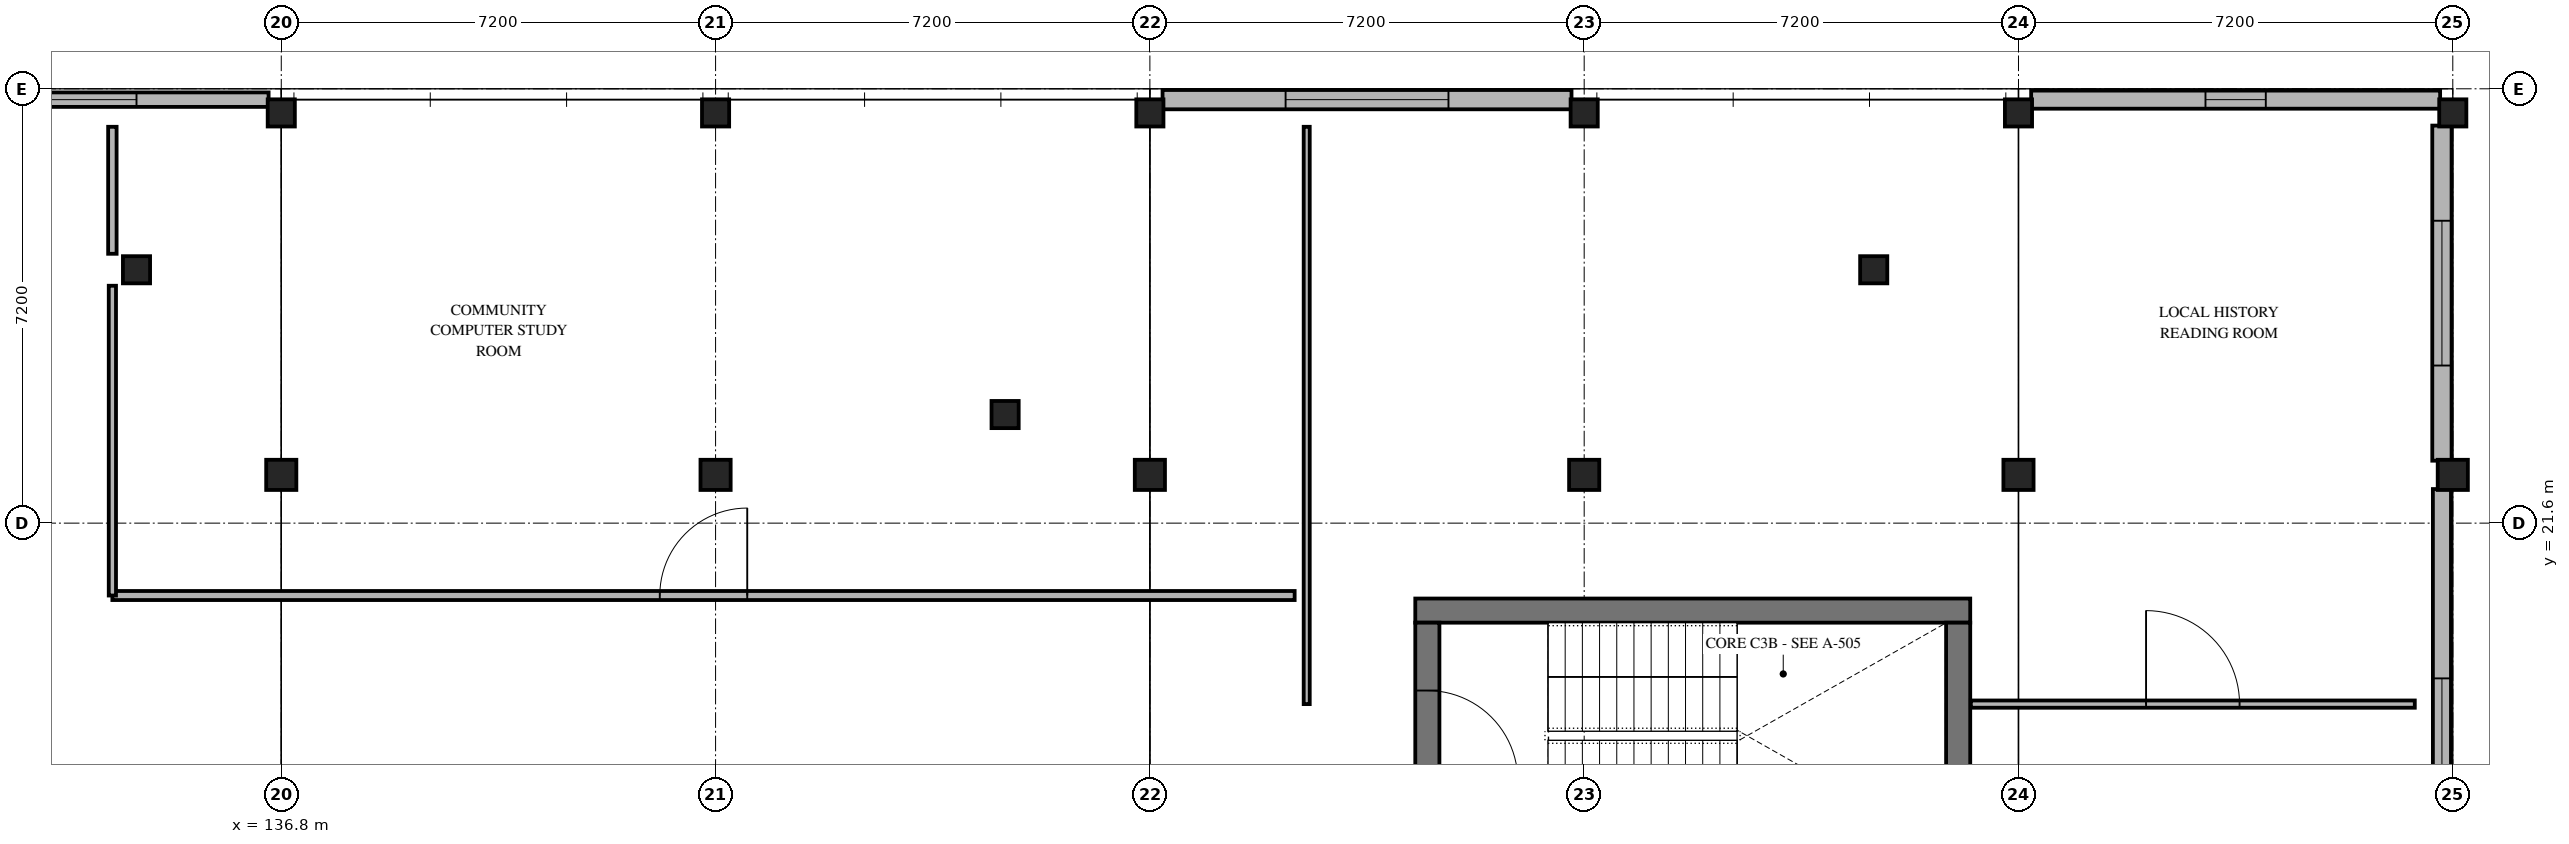
"""IFC4 building model, lengths in metres.
Left out: names, types, materials, properties, quantities, classifications, styles, units other than length and angle.
Written with IfcOpenShell. Run it as: python <this file> out.ifc"""

import sys

from ifc_helpers import new_model, si_unit, direction, frame, frame_2d, origin, origin_2d, place, context, subcontext, project, spatial, rectangle, extrude, element, fill, save


model = new_model("IFC4")
c1 = context("Model", 3, precision=1e-05, world=origin(), true_north=direction((0.0, 1.0)))
c2 = subcontext(c1, "Body", "Model", "MODEL_VIEW")
j1 = project(units=[si_unit("LENGTHUNIT", "METRE"), si_unit("PLANEANGLEUNIT", "RADIAN")], contexts=[c1])
p1 = place(None, origin())
s1 = spatial("IfcSite", under=j1, at=p1, CompositionType="ELEMENT")
p2 = place(p1, origin())
s2 = spatial("IfcBuilding", under=s1, at=p2, CompositionType="ELEMENT")
p3 = place(p2, frame((0.0, 0.0, 4.5)))
s3 = spatial("IfcBuildingStorey", under=s2, at=p3, CompositionType="ELEMENT", Elevation=4.5)
p4 = place(p3, frame((136.8, 22.4, 0.0), z_axis=(0.0, 0.0, 1.0), x_axis=(1.0, 0.0, 0.0)))
e1 = element("IfcColumn", 1, at=p4, inside=s3, PredefinedType="COLUMN", context=c2, shape_type="SweptSolid", body=[
    extrude(rectangle(XDim=0.5, YDim=0.5, at=origin_2d()), origin(), (0.0, 0.0, 1.0), 4.2),
])
p5 = place(p3, frame((136.8, 28.4, 0.0), z_axis=(0.0, 0.0, 1.0), x_axis=(1.0, 0.0, 0.0)))
e2 = element("IfcColumn", 2, at=p5, inside=s3, PredefinedType="COLUMN", context=c2, shape_type="SweptSolid", body=[
    extrude(rectangle(XDim=0.45, YDim=0.45, at=origin_2d()), origin(), (0.0, 0.0, 1.0), 4.2),
])
p6 = place(p3, frame((144.0, 22.4, 0.0), z_axis=(0.0, 0.0, 1.0), x_axis=(1.0, 0.0, 0.0)))
e3 = element("IfcColumn", 3, at=p6, inside=s3, PredefinedType="COLUMN", context=c2, shape_type="SweptSolid", body=[
    extrude(rectangle(XDim=0.5, YDim=0.5, at=origin_2d()), origin(), (0.0, 0.0, 1.0), 4.2),
])
p7 = place(p3, frame((144.0, 28.4, 0.0), z_axis=(0.0, 0.0, 1.0), x_axis=(1.0, 0.0, 0.0)))
e4 = element("IfcColumn", 4, at=p7, inside=s3, PredefinedType="COLUMN", context=c2, shape_type="SweptSolid", body=[
    extrude(rectangle(XDim=0.45, YDim=0.45, at=origin_2d()), origin(), (0.0, 0.0, 1.0), 4.2),
])
p8 = place(p3, frame((151.2, 22.4, 0.0), z_axis=(0.0, 0.0, 1.0), x_axis=(1.0, 0.0, 0.0)))
e5 = element("IfcColumn", 5, at=p8, inside=s3, PredefinedType="COLUMN", context=c2, shape_type="SweptSolid", body=[
    extrude(rectangle(XDim=0.5, YDim=0.5, at=origin_2d()), origin(), (0.0, 0.0, 1.0), 4.2),
])
p9 = place(p3, frame((151.2, 28.4, 0.0), z_axis=(0.0, 0.0, 1.0), x_axis=(1.0, 0.0, 0.0)))
e6 = element("IfcColumn", 6, at=p9, inside=s3, PredefinedType="COLUMN", context=c2, shape_type="SweptSolid", body=[
    extrude(rectangle(XDim=0.45, YDim=0.45, at=origin_2d()), origin(), (0.0, 0.0, 1.0), 4.2),
])
p10 = place(p3, frame((158.4, 22.4, 0.0), z_axis=(0.0, 0.0, 1.0), x_axis=(1.0, 0.0, 0.0)))
e7 = element("IfcColumn", 7, at=p10, inside=s3, PredefinedType="COLUMN", context=c2, shape_type="SweptSolid", body=[
    extrude(rectangle(XDim=0.5, YDim=0.5, at=origin_2d()), origin(), (0.0, 0.0, 1.0), 4.2),
])
p11 = place(p3, frame((158.4, 28.4, 0.0), z_axis=(0.0, 0.0, 1.0), x_axis=(1.0, 0.0, 0.0)))
e8 = element("IfcColumn", 8, at=p11, inside=s3, PredefinedType="COLUMN", context=c2, shape_type="SweptSolid", body=[
    extrude(rectangle(XDim=0.45, YDim=0.45, at=origin_2d()), origin(), (0.0, 0.0, 1.0), 4.2),
])
p12 = place(p3, frame((165.6, 22.4, 0.0), z_axis=(0.0, 0.0, 1.0), x_axis=(1.0, 0.0, 0.0)))
e9 = element("IfcColumn", 9, at=p12, inside=s3, PredefinedType="COLUMN", context=c2, shape_type="SweptSolid", body=[
    extrude(rectangle(XDim=0.5, YDim=0.5, at=origin_2d()), origin(), (0.0, 0.0, 1.0), 4.2),
])
p13 = place(p3, frame((165.6, 28.4, 0.0), z_axis=(0.0, 0.0, 1.0), x_axis=(1.0, 0.0, 0.0)))
e10 = element("IfcColumn", 10, at=p13, inside=s3, PredefinedType="COLUMN", context=c2, shape_type="SweptSolid", body=[
    extrude(rectangle(XDim=0.45, YDim=0.45, at=origin_2d()), origin(), (0.0, 0.0, 1.0), 4.2),
])
p14 = place(p3, frame((172.8, 22.4, 0.0), z_axis=(0.0, 0.0, 1.0), x_axis=(1.0, 0.0, 0.0)))
e11 = element("IfcColumn", 11, at=p14, inside=s3, PredefinedType="COLUMN", context=c2, shape_type="SweptSolid", body=[
    extrude(rectangle(XDim=0.5, YDim=0.5, at=origin_2d()), origin(), (0.0, 0.0, 1.0), 4.2),
])
for number, where, z_axis, x_axis in (
    (12, (172.8, 28.4, 0.0), (0.0, 0.0, 1.0), (1.0, 0.0, 0.0)),
    (13, (134.4, 25.8, 0.0), (0.0, 0.0, 1.0), (1.0, 0.0, 0.0)),
    (14, (148.8, 23.4, 0.0), (0.0, 0.0, 1.0), (1.0, 0.0, 0.0)),
    (15, (163.2, 25.8, 0.0), (0.0, 0.0, 1.0), (1.0, 0.0, 0.0)),
):
    element("IfcColumn", number, at=place(p3, frame(where, z_axis=z_axis, x_axis=x_axis)), inside=s3, PredefinedType="COLUMN", context=c2, shape_type="SweptSolid", body=[
        extrude(rectangle(XDim=0.45, YDim=0.45, at=origin_2d()), origin(), (0.0, 0.0, 1.0), 4.2),
    ])
p15 = place(p3, frame((172.62, 28.19, 0.0), z_axis=(0.0, 0.0, 1.0), x_axis=(0.0, -1.0, 0.0)))
e16 = element("IfcWall", 16, at=p15, inside=s3, PredefinedType="SOLIDWALL", context=c2, shape_type="SweptSolid", body=[
    extrude(rectangle(XDim=5.555, YDim=0.32, at=frame_2d((2.777, 0.0))), origin(), (0.0, 0.0, 1.0), 3.15),
])
p16 = place(p15, frame((1.577, 0.0, 0.75)))
e17 = element("IfcOpeningElement", 17, at=p16, cuts=e16, PredefinedType="OPENING", context=c2, shape_type="SweptSolid", body=[
    extrude(rectangle(XDim=2.4, YDim=1.65, at=frame_2d((1.2, 0.825))), frame((0.0, 0.17, 0.0), z_axis=(0.0, -1.0, 0.0), x_axis=(1.0, 0.0, 0.0)), (0.0, 0.0, 1.0), 0.34),
])
p17 = place(p3, frame((172.62, 22.165, 0.0), z_axis=(0.0, 0.0, 1.0), x_axis=(0.0, -1.0, 0.0)))
e18 = element("IfcWall", 18, at=p17, inside=s3, PredefinedType="SOLIDWALL", context=c2, shape_type="SweptSolid", body=[
    extrude(rectangle(XDim=7.777, YDim=0.3, at=frame_2d((3.889, 0.0))), origin(), (0.0, 0.0, 1.0), 3.33),
])
p18 = place(p17, frame((3.138, 0.0, 0.9)))
e19 = element("IfcOpeningElement", 19, at=p18, cuts=e18, PredefinedType="OPENING", context=c2, shape_type="SweptSolid", body=[
    extrude(rectangle(XDim=1.5, YDim=0.75, at=frame_2d((0.75, 0.375))), frame((0.0, 0.16, 0.0), z_axis=(0.0, -1.0, 0.0), x_axis=(1.0, 0.0, 0.0)), (0.0, 0.0, 1.0), 0.32),
])
p19 = place(p3, frame((129.81, 28.62, 0.0), z_axis=(0.0, 0.0, 1.0), x_axis=(1.0, 0.0, 0.0)))
e20 = element("IfcWall", 20, at=p19, inside=s3, PredefinedType="SOLIDWALL", context=c2, shape_type="SweptSolid", body=[
    extrude(rectangle(XDim=6.78, YDim=0.24, at=frame_2d((3.39, 0.0))), origin(), (0.0, 0.0, 1.0), 3.35),
])
p20 = place(p19, frame((2.19, 0.0, 0.9)))
e21 = element("IfcOpeningElement", 21, at=p20, cuts=e20, PredefinedType="OPENING", context=c2, shape_type="SweptSolid", body=[
    extrude(rectangle(XDim=2.4, YDim=0.75, at=frame_2d((1.2, 0.375))), frame((0.0, 0.13, 0.0), z_axis=(0.0, -1.0, 0.0), x_axis=(1.0, 0.0, 0.0)), (0.0, 0.0, 1.0), 0.26),
])
p21 = place(p3, frame((151.41, 28.62, 0.0), z_axis=(0.0, 0.0, 1.0), x_axis=(1.0, 0.0, 0.0)))
e22 = element("IfcWall", 22, at=p21, inside=s3, PredefinedType="SOLIDWALL", context=c2, shape_type="SweptSolid", body=[
    extrude(rectangle(XDim=6.78, YDim=0.32, at=frame_2d((3.39, 0.0))), origin(), (0.0, 0.0, 1.0), 3.25),
])
p22 = place(p21, frame((2.04, 0.0, 0.9)))
e23 = element("IfcOpeningElement", 23, at=p22, cuts=e22, PredefinedType="OPENING", context=c2, shape_type="SweptSolid", body=[
    extrude(rectangle(XDim=2.7, YDim=0.75, at=frame_2d((1.35, 0.375))), frame((0.0, 0.17, 0.0), z_axis=(0.0, -1.0, 0.0), x_axis=(1.0, 0.0, 0.0)), (0.0, 0.0, 1.0), 0.34),
])
p23 = place(p3, frame((165.81, 28.62, 0.0), z_axis=(0.0, 0.0, 1.0), x_axis=(1.0, 0.0, 0.0)))
e24 = element("IfcWall", 24, at=p23, inside=s3, PredefinedType="SOLIDWALL", context=c2, shape_type="SweptSolid", body=[
    extrude(rectangle(XDim=6.78, YDim=0.3, at=frame_2d((3.39, 0.0))), origin(), (0.0, 0.0, 1.0), 3.35),
])
p24 = place(p23, frame((2.89, 0.0, 0.75)))
e25 = element("IfcOpeningElement", 25, at=p24, cuts=e24, PredefinedType="OPENING", context=c2, shape_type="SweptSolid", body=[
    extrude(rectangle(XDim=1.0, YDim=1.45, at=frame_2d((0.5, 0.725))), frame((0.0, 0.16, 0.0), z_axis=(0.0, -1.0, 0.0), x_axis=(1.0, 0.0, 0.0)), (0.0, 0.0, 1.0), 0.32),
])
p25 = place(p3, frame((164.8, 20.15, 0.0), z_axis=(0.0, 0.0, 1.0), x_axis=(-1.0, 0.0, 0.0)))
e26 = element("IfcWall", 26, at=p25, inside=s3, PredefinedType="SHEAR", context=c2, shape_type="SweptSolid", body=[
    extrude(rectangle(XDim=9.2, YDim=0.4, at=frame_2d((4.6, 0.0))), origin(), (0.0, 0.0, 1.0), 3.95),
])
p26 = place(p3, frame((164.6, 16.2, 0.0), z_axis=(0.0, 0.0, 1.0), x_axis=(0.0, 1.0, 0.0)))
e27 = element("IfcWall", 27, at=p26, inside=s3, PredefinedType="SHEAR", context=c2, shape_type="SweptSolid", body=[
    extrude(rectangle(XDim=3.75, YDim=0.4, at=frame_2d((1.875, 0.0))), origin(), (0.0, 0.0, 1.0), 3.95),
])
p27 = place(p3, frame((155.8, 19.95, 0.0), z_axis=(0.0, 0.0, 1.0), x_axis=(0.0, -1.0, 0.0)))
e28 = element("IfcWall", 28, at=p27, inside=s3, PredefinedType="SHEAR", context=c2, shape_type="SweptSolid", body=[
    extrude(rectangle(XDim=3.75, YDim=0.4, at=frame_2d((1.875, 0.0))), origin(), (0.0, 0.0, 1.0), 3.95),
])
p28 = place(p27, frame((1.125, 0.0, 0.0)))
e29 = element("IfcOpeningElement", 29, at=p28, cuts=e28, PredefinedType="OPENING", context=c2, shape_type="SweptSolid", body=[
    extrude(rectangle(XDim=1.5, YDim=2.2, at=frame_2d((0.75, 1.1))), frame((0.0, 0.21, 0.0), z_axis=(0.0, -1.0, 0.0), x_axis=(1.0, 0.0, 0.0)), (0.0, 0.0, 1.0), 0.42),
])
p29 = place(p3, frame((164.81, 18.6, 0.0), z_axis=(0.0, 0.0, 1.0), x_axis=(1.0, 0.0, 0.0)))
e30 = element("IfcWall", 30, at=p29, inside=s3, PredefinedType="PARTITIONING", context=c2, shape_type="SweptSolid", body=[
    extrude(rectangle(XDim=7.36, YDim=0.12, at=frame_2d((3.68, 0.0))), origin(), (0.0, 0.0, 1.0), 3.25),
])
p30 = place(p29, frame((2.905, 0.0, 0.0)))
e31 = element("IfcOpeningElement", 31, at=p30, cuts=e30, PredefinedType="OPENING", context=c2, shape_type="SweptSolid", body=[
    extrude(rectangle(XDim=1.55, YDim=2.25, at=frame_2d((0.775, 1.125))), frame((0.0, 0.07, 0.0), z_axis=(0.0, -1.0, 0.0), x_axis=(1.0, 0.0, 0.0)), (0.0, 0.0, 1.0), 0.14),
])
p31 = place(p3, frame((153.8, 28.17, 0.0), z_axis=(0.0, 0.0, 1.0), x_axis=(0.0, -1.0, 0.0)))
e32 = element("IfcWall", 32, at=p31, inside=s3, PredefinedType="PARTITIONING", context=c2, shape_type="SweptSolid", body=[
    extrude(rectangle(XDim=9.57, YDim=0.1, at=frame_2d((4.785, 0.0))), origin(), (0.0, 0.0, 1.0), 3.25),
])
p32 = place(p3, frame((134.0, 20.4, 0.0), z_axis=(0.0, 0.0, 1.0), x_axis=(1.0, 0.0, 0.0)))
e33 = element("IfcWall", 33, at=p32, inside=s3, PredefinedType="PARTITIONING", context=c2, shape_type="SweptSolid", body=[
    extrude(rectangle(XDim=19.6, YDim=0.15, at=frame_2d((9.8, 0.0))), origin(), (0.0, 0.0, 1.0), 3.2),
])
p33 = place(p32, frame((9.075, 0.0, 0.0)))
e34 = element("IfcOpeningElement", 34, at=p33, cuts=e33, PredefinedType="OPENING", context=c2, shape_type="SweptSolid", body=[
    extrude(rectangle(XDim=1.45, YDim=2.25, at=frame_2d((0.725, 1.125))), frame((0.0, 0.085, 0.0), z_axis=(0.0, -1.0, 0.0), x_axis=(1.0, 0.0, 0.0)), (0.0, 0.0, 1.0), 0.17),
])
p34 = place(p3, frame((134.0, 28.17, 0.0), z_axis=(0.0, 0.0, 1.0), x_axis=(0.0, -1.0, 0.0)))
e35 = element("IfcWall", 35, at=p34, inside=s3, PredefinedType="PARTITIONING", context=c2, shape_type="SweptSolid", body=[
    extrude(rectangle(XDim=2.105, YDim=0.14, at=frame_2d((1.052, 0.0))), origin(), (0.0, 0.0, 1.0), 3.95),
])
p35 = place(p3, frame((134.0, 25.535, 0.0), z_axis=(0.0, 0.0, 1.0), x_axis=(0.0, -1.0, 0.0)))
e36 = element("IfcWall", 36, at=p35, inside=s3, PredefinedType="PARTITIONING", context=c2, shape_type="SweptSolid", body=[
    extrude(rectangle(XDim=5.135, YDim=0.12, at=frame_2d((2.567, 0.0))), origin(), (0.0, 0.0, 1.0), 3.33),
])
p36 = place(p16, origin())
e37 = element("IfcWindow", 37, at=p36, inside=s3, PartitioningType="SINGLE_PANEL", PredefinedType="WINDOW", context=c2, shape_type="SweptSolid", body=[
    extrude(rectangle(XDim=2.4, YDim=1.65, at=frame_2d((1.2, 0.825))), frame((0.0, 0.03, 0.0), z_axis=(0.0, -1.0, 0.0), x_axis=(1.0, 0.0, 0.0)), (0.0, 0.0, 1.0), 0.06),
])
fill(e17, e37)
p37 = place(p18, origin())
e38 = element("IfcWindow", 38, at=p37, inside=s3, PartitioningType="SINGLE_PANEL", PredefinedType="WINDOW", context=c2, shape_type="SweptSolid", body=[
    extrude(rectangle(XDim=1.5, YDim=0.75, at=frame_2d((0.75, 0.375))), frame((0.0, 0.03, 0.0), z_axis=(0.0, -1.0, 0.0), x_axis=(1.0, 0.0, 0.0)), (0.0, 0.0, 1.0), 0.06),
])
fill(e19, e38)
p38 = place(p20, origin())
e39 = element("IfcWindow", 39, at=p38, inside=s3, PartitioningType="SINGLE_PANEL", PredefinedType="WINDOW", context=c2, shape_type="SweptSolid", body=[
    extrude(rectangle(XDim=2.4, YDim=0.75, at=frame_2d((1.2, 0.375))), frame((0.0, 0.03, 0.0), z_axis=(0.0, -1.0, 0.0), x_axis=(1.0, 0.0, 0.0)), (0.0, 0.0, 1.0), 0.06),
])
fill(e21, e39)
p39 = place(p22, origin())
e40 = element("IfcWindow", 40, at=p39, inside=s3, PartitioningType="SINGLE_PANEL", PredefinedType="WINDOW", context=c2, shape_type="SweptSolid", body=[
    extrude(rectangle(XDim=2.7, YDim=0.75, at=frame_2d((1.35, 0.375))), frame((0.0, 0.03, 0.0), z_axis=(0.0, -1.0, 0.0), x_axis=(1.0, 0.0, 0.0)), (0.0, 0.0, 1.0), 0.06),
])
fill(e23, e40)
p40 = place(p24, origin())
e41 = element("IfcWindow", 41, at=p40, inside=s3, PartitioningType="SINGLE_PANEL", PredefinedType="WINDOW", context=c2, shape_type="SweptSolid", body=[
    extrude(rectangle(XDim=1.0, YDim=1.45, at=frame_2d((0.5, 0.725))), frame((0.0, 0.03, 0.0), z_axis=(0.0, -1.0, 0.0), x_axis=(1.0, 0.0, 0.0)), (0.0, 0.0, 1.0), 0.06),
])
fill(e25, e41)
p41 = place(p28, origin())
e42 = element("IfcDoor", 42, at=p41, inside=s3, OperationType="SINGLE_SWING_RIGHT", PredefinedType="DOOR", context=c2, shape_type="SweptSolid", body=[
    extrude(rectangle(XDim=1.5, YDim=2.2, at=frame_2d((0.75, 1.1))), frame((0.0, 0.025, 0.0), z_axis=(0.0, -1.0, 0.0), x_axis=(1.0, 0.0, 0.0)), (0.0, 0.0, 1.0), 0.05),
])
fill(e29, e42)
p42 = place(p30, origin())
e43 = element("IfcDoor", 43, at=p42, inside=s3, OperationType="SINGLE_SWING_LEFT", PredefinedType="DOOR", context=c2, shape_type="SweptSolid", body=[
    extrude(rectangle(XDim=1.55, YDim=2.25, at=frame_2d((0.775, 1.125))), frame((0.0, 0.025, 0.0), z_axis=(0.0, -1.0, 0.0), x_axis=(1.0, 0.0, 0.0)), (0.0, 0.0, 1.0), 0.05),
])
fill(e31, e43)
p43 = place(p33, origin())
e44 = element("IfcDoor", 44, at=p43, inside=s3, OperationType="SINGLE_SWING_RIGHT", PredefinedType="DOOR", context=c2, shape_type="SweptSolid", body=[
    extrude(rectangle(XDim=1.45, YDim=2.25, at=frame_2d((0.725, 1.125))), frame((0.0, 0.025, 0.0), z_axis=(0.0, -1.0, 0.0), x_axis=(1.0, 0.0, 0.0)), (0.0, 0.0, 1.0), 0.05),
])
fill(e34, e44)
save(model, sys.argv[1])
